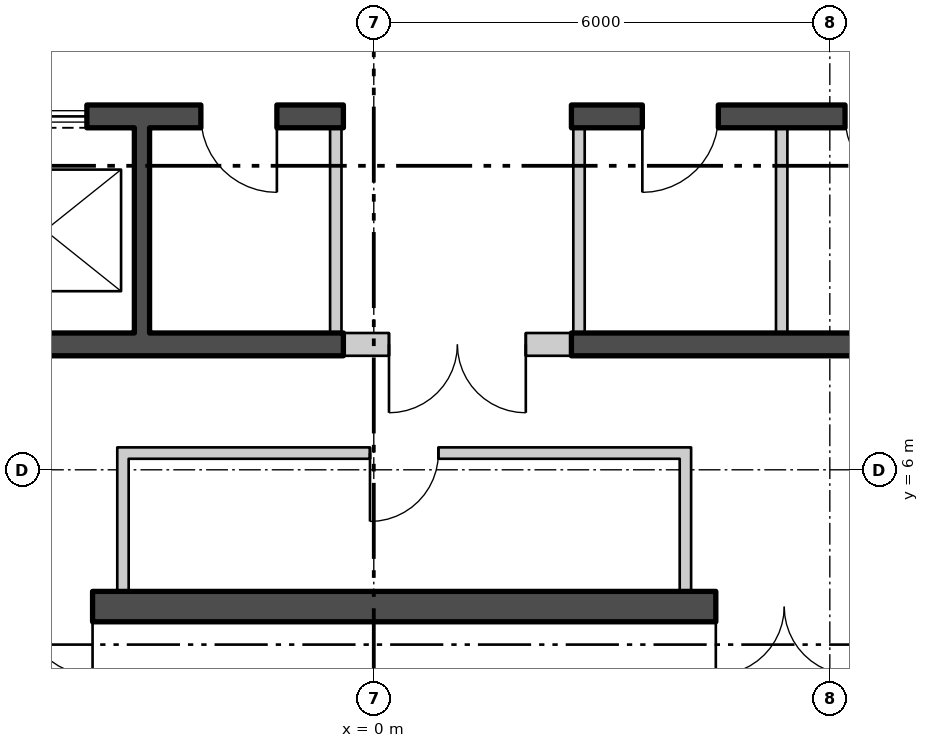
"""IFC4 building model, lengths in metres.
Left out: names, types, materials, properties, quantities, classifications, styles, units other than length and angle.
Written with IfcOpenShell. Run it as: python <this file> out.ifc"""

import sys

from ifc_helpers import new_model, si_unit, direction, frame, frame_2d, origin, place, context, subcontext, project, spatial, polyline, rectangle, outline, extrude, element, fill, save


model = new_model("IFC4")
c1 = context("Model", 3, precision=1e-05, world=origin(), true_north=direction((0.0, 1.0)))
c2 = subcontext(c1, "Body", "Model", "MODEL_VIEW")
j1 = project(units=[si_unit("LENGTHUNIT", "METRE"), si_unit("PLANEANGLEUNIT", "RADIAN")], contexts=[c1])
p1 = place(None, origin())
s1 = spatial("IfcSite", under=j1, at=p1, CompositionType="ELEMENT")
p2 = place(p1, origin())
s2 = spatial("IfcBuilding", under=s1, at=p2, CompositionType="ELEMENT")
p3 = place(p2, frame((0.0, 0.0, 257.1)))
s3 = spatial("IfcBuildingStorey", under=s2, at=p3, CompositionType="ELEMENT", Elevation=257.1)
p4 = place(p3, frame((-25.69, 15.082, -0.18), z_axis=(0.0, 0.0, 1.0), x_axis=(0.500000141277, -0.866025322218, 0.0)))
e1 = element("IfcWall", 1, at=p4, inside=s3, PredefinedType="SOLIDWALL", context=c2, shape_type="SweptSolid", body=[
    extrude(outline(polyline([(-0.13, -0.225), (45.86, -0.225), (45.6, 0.225), (0.13, 0.225), (-0.13, -0.225)])), origin(), (0.0, 0.0, 1.0), 3.68),
])
p5 = place(p4, frame((1.424, 0.0, 1.08)))
e2 = element("IfcOpeningElement", 2, at=p5, cuts=e1, PredefinedType="OPENING", context=c2, shape_type="SweptSolid", body=[
    extrude(rectangle(XDim=2.4, YDim=2.0, at=frame_2d((1.2, 1.0))), frame((0.0, 0.235, 0.0), z_axis=(0.0, -1.0, 0.0), x_axis=(1.0, 0.0, 0.0)), (0.0, 0.0, 1.0), 0.47),
])
p6 = place(p4, frame((5.892, 0.0, 1.08)))
e3 = element("IfcOpeningElement", 3, at=p6, cuts=e1, PredefinedType="OPENING", context=c2, shape_type="SweptSolid", body=[
    extrude(rectangle(XDim=2.4, YDim=2.0, at=frame_2d((1.2, 1.0))), frame((0.0, 0.235, 0.0), z_axis=(0.0, -1.0, 0.0), x_axis=(1.0, 0.0, 0.0)), (0.0, 0.0, 1.0), 0.47),
])
p7 = place(p4, frame((10.399, 0.0, 1.08)))
e4 = element("IfcOpeningElement", 4, at=p7, cuts=e1, PredefinedType="OPENING", context=c2, shape_type="SweptSolid", body=[
    extrude(rectangle(XDim=2.4, YDim=2.0, at=frame_2d((1.2, 1.0))), frame((0.0, 0.235, 0.0), z_axis=(0.0, -1.0, 0.0), x_axis=(1.0, 0.0, 0.0)), (0.0, 0.0, 1.0), 0.47),
])
p8 = place(p4, frame((14.905, 0.0, 1.08)))
e5 = element("IfcOpeningElement", 5, at=p8, cuts=e1, PredefinedType="OPENING", context=c2, shape_type="SweptSolid", body=[
    extrude(rectangle(XDim=2.4, YDim=2.0, at=frame_2d((1.2, 1.0))), frame((0.0, 0.235, 0.0), z_axis=(0.0, -1.0, 0.0), x_axis=(1.0, 0.0, 0.0)), (0.0, 0.0, 1.0), 0.47),
])
p9 = place(p4, frame((19.412, 0.0, 1.08)))
e6 = element("IfcOpeningElement", 6, at=p9, cuts=e1, PredefinedType="OPENING", context=c2, shape_type="SweptSolid", body=[
    extrude(rectangle(XDim=2.4, YDim=2.0, at=frame_2d((1.2, 1.0))), frame((0.0, 0.235, 0.0), z_axis=(0.0, -1.0, 0.0), x_axis=(1.0, 0.0, 0.0)), (0.0, 0.0, 1.0), 0.47),
])
p10 = place(p4, frame((23.918, 0.0, 1.08)))
e7 = element("IfcOpeningElement", 7, at=p10, cuts=e1, PredefinedType="OPENING", context=c2, shape_type="SweptSolid", body=[
    extrude(rectangle(XDim=2.4, YDim=2.0, at=frame_2d((1.2, 1.0))), frame((0.0, 0.235, 0.0), z_axis=(0.0, -1.0, 0.0), x_axis=(1.0, 0.0, 0.0)), (0.0, 0.0, 1.0), 0.47),
])
p11 = place(p4, frame((28.425, 0.0, 1.08)))
e8 = element("IfcOpeningElement", 8, at=p11, cuts=e1, PredefinedType="OPENING", context=c2, shape_type="SweptSolid", body=[
    extrude(rectangle(XDim=2.4, YDim=2.0, at=frame_2d((1.2, 1.0))), frame((0.0, 0.235, 0.0), z_axis=(0.0, -1.0, 0.0), x_axis=(1.0, 0.0, 0.0)), (0.0, 0.0, 1.0), 0.47),
])
p12 = place(p4, frame((32.932, 0.0, 1.08)))
e9 = element("IfcOpeningElement", 9, at=p12, cuts=e1, PredefinedType="OPENING", context=c2, shape_type="SweptSolid", body=[
    extrude(rectangle(XDim=2.4, YDim=2.0, at=frame_2d((1.2, 1.0))), frame((0.0, 0.235, 0.0), z_axis=(0.0, -1.0, 0.0), x_axis=(1.0, 0.0, 0.0)), (0.0, 0.0, 1.0), 0.47),
])
p13 = place(p4, frame((37.438, 0.0, 1.08)))
e10 = element("IfcOpeningElement", 10, at=p13, cuts=e1, PredefinedType="OPENING", context=c2, shape_type="SweptSolid", body=[
    extrude(rectangle(XDim=2.4, YDim=2.0, at=frame_2d((1.2, 1.0))), frame((0.0, 0.235, 0.0), z_axis=(0.0, -1.0, 0.0), x_axis=(1.0, 0.0, 0.0)), (0.0, 0.0, 1.0), 0.47),
])
p14 = place(p4, frame((41.907, 0.0, 1.08)))
e11 = element("IfcOpeningElement", 11, at=p14, cuts=e1, PredefinedType="OPENING", context=c2, shape_type="SweptSolid", body=[
    extrude(rectangle(XDim=2.4, YDim=2.0, at=frame_2d((1.2, 1.0))), frame((0.0, 0.235, 0.0), z_axis=(0.0, -1.0, 0.0), x_axis=(1.0, 0.0, 0.0)), (0.0, 0.0, 1.0), 0.47),
])
p15 = place(p3, frame((2.825, -24.522, -0.18), z_axis=(0.0, 0.0, 1.0), x_axis=(0.500000141277, 0.866025322218, 0.0)))
e12 = element("IfcWall", 12, at=p15, inside=s3, PredefinedType="SOLIDWALL", context=c2, shape_type="SweptSolid", body=[
    extrude(outline(polyline([(-0.13, -0.225), (45.86, -0.225), (45.6, 0.225), (0.13, 0.225), (-0.13, -0.225)])), origin(), (0.0, 0.0, 1.0), 3.68),
])
p16 = place(p15, frame((1.424, 0.0, 1.08)))
e13 = element("IfcOpeningElement", 13, at=p16, cuts=e12, PredefinedType="OPENING", context=c2, shape_type="SweptSolid", body=[
    extrude(rectangle(XDim=2.4, YDim=2.0, at=frame_2d((1.2, 1.0))), frame((0.0, 0.235, 0.0), z_axis=(0.0, -1.0, 0.0), x_axis=(1.0, 0.0, 0.0)), (0.0, 0.0, 1.0), 0.47),
])
p17 = place(p15, frame((5.892, 0.0, 1.08)))
e14 = element("IfcOpeningElement", 14, at=p17, cuts=e12, PredefinedType="OPENING", context=c2, shape_type="SweptSolid", body=[
    extrude(rectangle(XDim=2.4, YDim=2.0, at=frame_2d((1.2, 1.0))), frame((0.0, 0.235, 0.0), z_axis=(0.0, -1.0, 0.0), x_axis=(1.0, 0.0, 0.0)), (0.0, 0.0, 1.0), 0.47),
])
p18 = place(p15, frame((10.399, 0.0, 1.08)))
e15 = element("IfcOpeningElement", 15, at=p18, cuts=e12, PredefinedType="OPENING", context=c2, shape_type="SweptSolid", body=[
    extrude(rectangle(XDim=2.4, YDim=2.0, at=frame_2d((1.2, 1.0))), frame((0.0, 0.235, 0.0), z_axis=(0.0, -1.0, 0.0), x_axis=(1.0, 0.0, 0.0)), (0.0, 0.0, 1.0), 0.47),
])
p19 = place(p15, frame((14.905, 0.0, 1.08)))
e16 = element("IfcOpeningElement", 16, at=p19, cuts=e12, PredefinedType="OPENING", context=c2, shape_type="SweptSolid", body=[
    extrude(rectangle(XDim=2.4, YDim=2.0, at=frame_2d((1.2, 1.0))), frame((0.0, 0.235, 0.0), z_axis=(0.0, -1.0, 0.0), x_axis=(1.0, 0.0, 0.0)), (0.0, 0.0, 1.0), 0.47),
])
p20 = place(p15, frame((19.412, 0.0, 1.08)))
e17 = element("IfcOpeningElement", 17, at=p20, cuts=e12, PredefinedType="OPENING", context=c2, shape_type="SweptSolid", body=[
    extrude(rectangle(XDim=2.4, YDim=2.0, at=frame_2d((1.2, 1.0))), frame((0.0, 0.235, 0.0), z_axis=(0.0, -1.0, 0.0), x_axis=(1.0, 0.0, 0.0)), (0.0, 0.0, 1.0), 0.47),
])
p21 = place(p15, frame((28.425, 0.0, 1.08)))
e18 = element("IfcOpeningElement", 18, at=p21, cuts=e12, PredefinedType="OPENING", context=c2, shape_type="SweptSolid", body=[
    extrude(rectangle(XDim=2.4, YDim=2.0, at=frame_2d((1.2, 1.0))), frame((0.0, 0.235, 0.0), z_axis=(0.0, -1.0, 0.0), x_axis=(1.0, 0.0, 0.0)), (0.0, 0.0, 1.0), 0.47),
])
p22 = place(p15, frame((37.438, 0.0, 1.08)))
e19 = element("IfcOpeningElement", 19, at=p22, cuts=e12, PredefinedType="OPENING", context=c2, shape_type="SweptSolid", body=[
    extrude(rectangle(XDim=2.4, YDim=2.0, at=frame_2d((1.2, 1.0))), frame((0.0, 0.235, 0.0), z_axis=(0.0, -1.0, 0.0), x_axis=(1.0, 0.0, 0.0)), (0.0, 0.0, 1.0), 0.47),
])
p23 = place(p15, frame((41.907, 0.0, 1.08)))
e20 = element("IfcOpeningElement", 20, at=p23, cuts=e12, PredefinedType="OPENING", context=c2, shape_type="SweptSolid", body=[
    extrude(rectangle(XDim=2.4, YDim=2.0, at=frame_2d((1.2, 1.0))), frame((0.0, 0.235, 0.0), z_axis=(0.0, -1.0, 0.0), x_axis=(1.0, 0.0, 0.0)), (0.0, 0.0, 1.0), 0.47),
])
p24 = place(p3, frame((-14.5, 4.2, 0.0), z_axis=(0.0, 0.0, 1.0), x_axis=(1.0, 0.0, 0.0)))
e21 = element("IfcWall", 21, at=p24, inside=s3, PredefinedType="SHEAR", context=c2, shape_type="SweptSolid", body=[
    extrude(rectangle(XDim=29.0, YDim=0.4, at=frame_2d((14.5, 0.0))), origin(), (0.0, 0.0, 1.0), 3.7),
])
p25 = place(p24, frame((9.0, 0.0, 0.0)))
e22 = element("IfcOpeningElement", 22, at=p25, cuts=e21, PredefinedType="OPENING", context=c2, shape_type="SweptSolid", body=[
    extrude(rectangle(XDim=1.8, YDim=2.4, at=frame_2d((0.9, 1.2))), frame((0.0, 0.21, 0.0), z_axis=(0.0, -1.0, 0.0), x_axis=(1.0, 0.0, 0.0)), (0.0, 0.0, 1.0), 0.42),
])
p26 = place(p24, frame((19.0, 0.0, 0.0)))
e23 = element("IfcOpeningElement", 23, at=p26, cuts=e21, PredefinedType="OPENING", context=c2, shape_type="SweptSolid", body=[
    extrude(rectangle(XDim=1.8, YDim=2.4, at=frame_2d((0.9, 1.2))), frame((0.0, 0.21, 0.0), z_axis=(0.0, -1.0, 0.0), x_axis=(1.0, 0.0, 0.0)), (0.0, 0.0, 1.0), 0.42),
])
p27 = place(p3, frame((-10.7, 10.65, 0.0), z_axis=(0.0, 0.0, 1.0), x_axis=(1.0, 0.0, 0.0)))
e24 = element("IfcWall", 24, at=p27, inside=s3, PredefinedType="SHEAR", context=c2, shape_type="SweptSolid", body=[
    extrude(rectangle(XDim=10.3, YDim=0.3, at=frame_2d((5.15, 0.0))), origin(), (0.0, 0.0, 1.0), 3.7),
])
p28 = place(p27, frame((0.675, 0.0, 0.0)))
e25 = element("IfcOpeningElement", 25, at=p28, cuts=e24, PredefinedType="OPENING", context=c2, shape_type="SweptSolid", body=[
    extrude(rectangle(XDim=1.1, YDim=2.1, at=frame_2d((0.55, 1.05))), frame((0.0, 0.16, 0.0), z_axis=(0.0, -1.0, 0.0), x_axis=(1.0, 0.0, 0.0)), (0.0, 0.0, 1.0), 0.32),
])
p29 = place(p27, frame((3.275, 0.0, 0.0)))
e26 = element("IfcOpeningElement", 26, at=p29, cuts=e24, PredefinedType="OPENING", context=c2, shape_type="SweptSolid", body=[
    extrude(rectangle(XDim=1.1, YDim=2.1, at=frame_2d((0.55, 1.05))), frame((0.0, 0.16, 0.0), z_axis=(0.0, -1.0, 0.0), x_axis=(1.0, 0.0, 0.0)), (0.0, 0.0, 1.0), 0.32),
])
p30 = place(p27, frame((5.825, 0.0, 0.0)))
e27 = element("IfcOpeningElement", 27, at=p30, cuts=e24, PredefinedType="OPENING", context=c2, shape_type="SweptSolid", body=[
    extrude(rectangle(XDim=1.1, YDim=2.1, at=frame_2d((0.55, 1.05))), frame((0.0, 0.16, 0.0), z_axis=(0.0, -1.0, 0.0), x_axis=(1.0, 0.0, 0.0)), (0.0, 0.0, 1.0), 0.32),
])
p31 = place(p27, frame((8.425, 0.0, 0.0)))
e28 = element("IfcOpeningElement", 28, at=p31, cuts=e24, PredefinedType="OPENING", context=c2, shape_type="SweptSolid", body=[
    extrude(rectangle(XDim=1.0, YDim=2.1, at=frame_2d((0.5, 1.05))), frame((0.0, 0.16, 0.0), z_axis=(0.0, -1.0, 0.0), x_axis=(1.0, 0.0, 0.0)), (0.0, 0.0, 1.0), 0.32),
])
p32 = place(p3, frame((-10.7, 7.65, 0.0), z_axis=(0.0, 0.0, 1.0), x_axis=(1.0, 0.0, 0.0)))
e29 = element("IfcWall", 29, at=p32, inside=s3, PredefinedType="SHEAR", context=c2, shape_type="SweptSolid", body=[
    extrude(rectangle(XDim=10.3, YDim=0.3, at=frame_2d((5.15, 0.0))), origin(), (0.0, 0.0, 1.0), 3.7),
])
p33 = place(p3, frame((2.6, 10.65, 0.0), z_axis=(0.0, 0.0, 1.0), x_axis=(1.0, 0.0, 0.0)))
e30 = element("IfcWall", 30, at=p33, inside=s3, PredefinedType="SHEAR", context=c2, shape_type="SweptSolid", body=[
    extrude(rectangle(XDim=8.1, YDim=0.3, at=frame_2d((4.05, 0.0))), origin(), (0.0, 0.0, 1.0), 3.7),
])
p34 = place(p33, frame((0.933, 0.0, 0.0)))
e31 = element("IfcOpeningElement", 31, at=p34, cuts=e30, PredefinedType="OPENING", context=c2, shape_type="SweptSolid", body=[
    extrude(rectangle(XDim=1.0, YDim=2.1, at=frame_2d((0.5, 1.05))), frame((0.0, 0.16, 0.0), z_axis=(0.0, -1.0, 0.0), x_axis=(1.0, 0.0, 0.0)), (0.0, 0.0, 1.0), 0.32),
])
p35 = place(p33, frame((3.6, 0.0, 0.0)))
e32 = element("IfcOpeningElement", 32, at=p35, cuts=e30, PredefinedType="OPENING", context=c2, shape_type="SweptSolid", body=[
    extrude(rectangle(XDim=1.0, YDim=2.1, at=frame_2d((0.5, 1.05))), frame((0.0, 0.16, 0.0), z_axis=(0.0, -1.0, 0.0), x_axis=(1.0, 0.0, 0.0)), (0.0, 0.0, 1.0), 0.32),
])
p36 = place(p3, frame((2.6, 7.65, 0.0), z_axis=(0.0, 0.0, 1.0), x_axis=(1.0, 0.0, 0.0)))
e33 = element("IfcWall", 33, at=p36, inside=s3, PredefinedType="SHEAR", context=c2, shape_type="SweptSolid", body=[
    extrude(rectangle(XDim=8.1, YDim=0.3, at=frame_2d((4.05, 0.0))), origin(), (0.0, 0.0, 1.0), 3.7),
])
p37 = place(p3, frame((-3.05, 7.8, 0.0), z_axis=(0.0, 0.0, 1.0), x_axis=(0.0, 1.0, 0.0)))
e34 = element("IfcWall", 34, at=p37, inside=s3, PredefinedType="SHEAR", context=c2, shape_type="SweptSolid", body=[
    extrude(rectangle(XDim=2.7, YDim=0.2, at=frame_2d((1.35, 0.0))), origin(), (0.0, 0.0, 1.0), 3.7),
])
for number, where, z_axis, x_axis in (
    (35, (-0.5, 7.8, 0.0), (0.0, 0.0, 1.0), (0.0, 1.0, 0.0)),
    (36, (2.7, 7.8, 0.0), (0.0, 0.0, 1.0), (0.0, 1.0, 0.0)),
    (37, (5.367, 7.8, 0.0), (0.0, 0.0, 1.0), (0.0, 1.0, 0.0)),
):
    element("IfcWall", number, at=place(p3, frame(where, z_axis=z_axis, x_axis=x_axis)), inside=s3, PredefinedType="PARTITIONING", context=c2, shape_type="SweptSolid", body=[
        extrude(rectangle(XDim=2.7, YDim=0.15, at=frame_2d((1.35, 0.0))), origin(), (0.0, 0.0, 1.0), 3.7),
    ])
for number, where, z_axis, x_axis in (
    (38, (-3.3, 4.4, 0.0), (0.0, 0.0, 1.0), (0.0, 1.0, 0.0)),
    (39, (4.1, 4.4, 0.0), (0.0, 0.0, 1.0), (0.0, 1.0, 0.0)),
):
    element("IfcWall", number, at=place(p3, frame(where, z_axis=z_axis, x_axis=x_axis)), inside=s3, PredefinedType="PARTITIONING", context=c2, shape_type="SweptSolid", body=[
        extrude(rectangle(XDim=1.895, YDim=0.15, at=frame_2d((0.948, 0.0))), origin(), (0.0, 0.0, 1.0), 3.7),
    ])
p38 = place(p3, frame((-3.225, 6.22, 0.0), z_axis=(0.0, 0.0, 1.0), x_axis=(1.0, 0.0, 0.0)))
e40 = element("IfcWall", 40, at=p38, inside=s3, PredefinedType="PARTITIONING", context=c2, shape_type="SweptSolid", body=[
    extrude(rectangle(XDim=7.25, YDim=0.15, at=frame_2d((3.625, 0.0))), origin(), (0.0, 0.0, 1.0), 3.7),
])
p39 = place(p38, frame((3.175, 0.0, 0.0)))
e41 = element("IfcOpeningElement", 41, at=p39, cuts=e40, PredefinedType="OPENING", context=c2, shape_type="SweptSolid", body=[
    extrude(rectangle(XDim=0.9, YDim=2.1, at=frame_2d((0.45, 1.05))), frame((0.0, 0.085, 0.0), z_axis=(0.0, -1.0, 0.0), x_axis=(1.0, 0.0, 0.0)), (0.0, 0.0, 1.0), 0.17),
])
p40 = place(p3, frame((-0.4, 7.65, 0.0), z_axis=(0.0, 0.0, 1.0), x_axis=(1.0, 0.0, 0.0)))
e42 = element("IfcWall", 42, at=p40, inside=s3, PredefinedType="PARTITIONING", context=c2, shape_type="SweptSolid", body=[
    extrude(rectangle(XDim=3.0, YDim=0.3, at=frame_2d((1.5, 0.0))), origin(), (0.0, 0.0, 1.0), 3.7),
])
p41 = place(p40, frame((0.6, 0.0, 0.0)))
e43 = element("IfcOpeningElement", 43, at=p41, cuts=e42, PredefinedType="OPENING", context=c2, shape_type="SweptSolid", body=[
    extrude(rectangle(XDim=1.8, YDim=2.4, at=frame_2d((0.9, 1.2))), frame((0.0, 0.16, 0.0), z_axis=(0.0, -1.0, 0.0), x_axis=(1.0, 0.0, 0.0)), (0.0, 0.0, 1.0), 0.32),
])
p42 = place(p30, origin())
e44 = element("IfcDoor", 44, at=p42, inside=s3, OperationType="SLIDING_TO_LEFT", PredefinedType="DOOR", context=c2, shape_type="SweptSolid", body=[
    extrude(rectangle(XDim=1.1, YDim=2.1, at=frame_2d((0.55, 1.05))), frame((0.0, 0.025, 0.0), z_axis=(0.0, -1.0, 0.0), x_axis=(1.0, 0.0, 0.0)), (0.0, 0.0, 1.0), 0.05),
])
fill(e27, e44)
p43 = place(p31, origin())
e45 = element("IfcDoor", 45, at=p43, inside=s3, OperationType="SINGLE_SWING_RIGHT", PredefinedType="DOOR", context=c2, shape_type="SweptSolid", body=[
    extrude(rectangle(XDim=1.0, YDim=2.1, at=frame_2d((0.5, 1.05))), frame((0.0, 0.025, 0.0), z_axis=(0.0, -1.0, 0.0), x_axis=(1.0, 0.0, 0.0)), (0.0, 0.0, 1.0), 0.05),
])
fill(e28, e45)
p44 = place(p34, origin())
e46 = element("IfcDoor", 46, at=p44, inside=s3, OperationType="SINGLE_SWING_LEFT", PredefinedType="DOOR", context=c2, shape_type="SweptSolid", body=[
    extrude(rectangle(XDim=1.0, YDim=2.1, at=frame_2d((0.5, 1.05))), frame((0.0, 0.025, 0.0), z_axis=(0.0, -1.0, 0.0), x_axis=(1.0, 0.0, 0.0)), (0.0, 0.0, 1.0), 0.05),
])
fill(e31, e46)
p45 = place(p35, origin())
e47 = element("IfcDoor", 47, at=p45, inside=s3, OperationType="SINGLE_SWING_RIGHT", PredefinedType="DOOR", context=c2, shape_type="SweptSolid", body=[
    extrude(rectangle(XDim=1.0, YDim=2.1, at=frame_2d((0.5, 1.05))), frame((0.0, 0.025, 0.0), z_axis=(0.0, -1.0, 0.0), x_axis=(1.0, 0.0, 0.0)), (0.0, 0.0, 1.0), 0.05),
])
fill(e32, e47)
p46 = place(p39, origin())
e48 = element("IfcDoor", 48, at=p46, inside=s3, OperationType="SINGLE_SWING_LEFT", PredefinedType="DOOR", context=c2, shape_type="SweptSolid", body=[
    extrude(rectangle(XDim=0.9, YDim=2.1, at=frame_2d((0.45, 1.05))), frame((0.0, 0.025, 0.0), z_axis=(0.0, -1.0, 0.0), x_axis=(1.0, 0.0, 0.0)), (0.0, 0.0, 1.0), 0.05),
])
fill(e41, e48)
p47 = place(p41, origin())
e49 = element("IfcDoor", 49, at=p47, inside=s3, OperationType="DOUBLE_DOOR_SINGLE_SWING", PredefinedType="DOOR", context=c2, shape_type="SweptSolid", body=[
    extrude(rectangle(XDim=1.8, YDim=2.4, at=frame_2d((0.9, 1.2))), frame((0.0, 0.025, 0.0), z_axis=(0.0, -1.0, 0.0), x_axis=(1.0, 0.0, 0.0)), (0.0, 0.0, 1.0), 0.05),
])
fill(e43, e49)
p48 = place(p25, origin())
e50 = element("IfcDoor", 50, at=p48, inside=s3, OperationType="DOUBLE_DOOR_SINGLE_SWING", PredefinedType="DOOR", context=c2, shape_type="SweptSolid", body=[
    extrude(rectangle(XDim=1.8, YDim=2.4, at=frame_2d((0.9, 1.2))), frame((0.0, 0.025, 0.0), z_axis=(0.0, -1.0, 0.0), x_axis=(1.0, 0.0, 0.0)), (0.0, 0.0, 1.0), 0.05),
])
fill(e22, e50)
p49 = place(p26, origin())
e51 = element("IfcDoor", 51, at=p49, inside=s3, OperationType="DOUBLE_DOOR_SINGLE_SWING", PredefinedType="DOOR", context=c2, shape_type="SweptSolid", body=[
    extrude(rectangle(XDim=1.8, YDim=2.4, at=frame_2d((0.9, 1.2))), frame((0.0, 0.025, 0.0), z_axis=(0.0, -1.0, 0.0), x_axis=(1.0, 0.0, 0.0)), (0.0, 0.0, 1.0), 0.05),
])
fill(e23, e51)
save(model, sys.argv[1])
